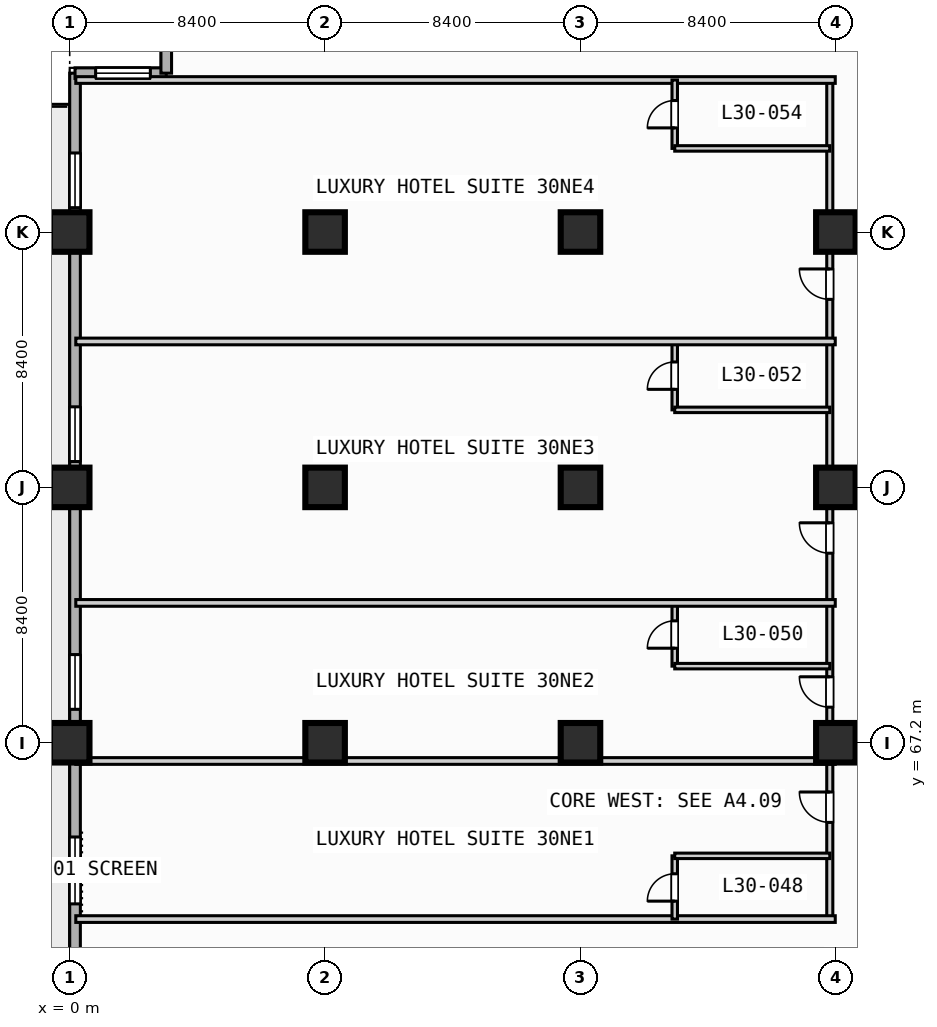
"""IFC4 building model, lengths in metres.
Left out: names, types, materials, properties, quantities, classifications, styles, units other than length and angle.
Written with IfcOpenShell. Run it as: python <this file> out.ifc"""

import sys

from ifc_helpers import new_model, si_unit, direction, frame, frame_2d, origin, origin_2d, place, context, subcontext, project, spatial, rectangle, extrude, element, fill, save


model = new_model("IFC4")
c1 = context("Model", 3, precision=1e-05, world=origin(), true_north=direction((0.0, 1.0)))
c2 = subcontext(c1, "Body", "Model", "MODEL_VIEW")
j1 = project(units=[si_unit("LENGTHUNIT", "METRE"), si_unit("PLANEANGLEUNIT", "RADIAN")], contexts=[c1])
p1 = place(None, origin())
s1 = spatial("IfcSite", under=j1, at=p1, CompositionType="ELEMENT")
p2 = place(p1, origin())
s2 = spatial("IfcBuilding", under=s1, at=p2, CompositionType="ELEMENT")
p3 = place(p2, frame((0.0, 0.0, 126.6)))
s3 = spatial("IfcBuildingStorey", under=s2, at=p3, CompositionType="ELEMENT", Elevation=126.6)
for number, where, z_axis, x_axis in (
    (1, (0.0, 67.2, 0.0), (0.0, 0.0, 1.0), (1.0, 0.0, 0.0)),
    (2, (0.0, 75.6, 0.0), (0.0, 0.0, 1.0), (1.0, 0.0, 0.0)),
    (3, (0.0, 84.0, 0.0), (0.0, 0.0, 1.0), (1.0, 0.0, 0.0)),
    (4, (8.4, 67.2, 0.0), (0.0, 0.0, 1.0), (1.0, 0.0, 0.0)),
    (5, (8.4, 75.6, 0.0), (0.0, 0.0, 1.0), (1.0, 0.0, 0.0)),
    (6, (8.4, 84.0, 0.0), (0.0, 0.0, 1.0), (1.0, 0.0, 0.0)),
    (7, (16.8, 67.2, 0.0), (0.0, 0.0, 1.0), (1.0, 0.0, 0.0)),
    (8, (16.8, 75.6, 0.0), (0.0, 0.0, 1.0), (1.0, 0.0, 0.0)),
    (9, (16.8, 84.0, 0.0), (0.0, 0.0, 1.0), (1.0, 0.0, 0.0)),
    (10, (25.2, 67.2, 0.0), (0.0, 0.0, 1.0), (1.0, 0.0, 0.0)),
    (11, (25.2, 75.6, 0.0), (0.0, 0.0, 1.0), (1.0, 0.0, 0.0)),
    (12, (25.2, 84.0, 0.0), (0.0, 0.0, 1.0), (1.0, 0.0, 0.0)),
):
    element("IfcColumn", number, at=place(p3, frame(where, z_axis=z_axis, x_axis=x_axis)), inside=s3, PredefinedType="COLUMN", context=c2, shape_type="SweptSolid", body=[
        extrude(rectangle(XDim=1.3, YDim=1.3, at=origin_2d()), origin(), (0.0, 0.0, 1.0), 3.8),
    ])
p4 = place(p3, frame((0.175, 3.175, 0.0), z_axis=(0.0, 0.0, 1.0), x_axis=(0.0, 1.0, 0.0)))
e13 = element("IfcWall", 13, at=p4, inside=s3, PredefinedType="STANDARD", context=c2, shape_type="SweptSolid", body=[
    extrude(rectangle(XDim=86.05, YDim=0.35, at=frame_2d((43.025, 0.0))), origin(), (0.0, 0.0, 1.0), 3.55),
])
p5 = place(p4, frame((42.325, 0.0, 0.0)))
e14 = element("IfcOpeningElement", 14, at=p5, cuts=e13, PredefinedType="OPENING", context=c2, shape_type="SweptSolid", body=[
    extrude(rectangle(XDim=1.4, YDim=2.2, at=frame_2d((0.7, 1.1))), frame((0.0, 0.185, 0.0), z_axis=(0.0, -1.0, 0.0), x_axis=(1.0, 0.0, 0.0)), (0.0, 0.0, 1.0), 0.37),
])
p6 = place(p4, frame((33.525, 0.0, 0.85)))
e15 = element("IfcOpeningElement", 15, at=p6, cuts=e13, PredefinedType="OPENING", context=c2, shape_type="SweptSolid", body=[
    extrude(rectangle(XDim=2.2, YDim=1.8, at=frame_2d((1.1, 0.9))), frame((0.0, 0.185, 0.0), z_axis=(0.0, -1.0, 0.0), x_axis=(1.0, 0.0, 0.0)), (0.0, 0.0, 1.0), 0.37),
])
p7 = place(p4, frame((58.725, 0.0, 0.85)))
e16 = element("IfcOpeningElement", 16, at=p7, cuts=e13, PredefinedType="OPENING", context=c2, shape_type="SweptSolid", body=[
    extrude(rectangle(XDim=2.2, YDim=1.8, at=frame_2d((1.1, 0.9))), frame((0.0, 0.185, 0.0), z_axis=(0.0, -1.0, 0.0), x_axis=(1.0, 0.0, 0.0)), (0.0, 0.0, 1.0), 0.37),
])
p8 = place(p4, frame((65.125, 0.0, 0.85)))
e17 = element("IfcOpeningElement", 17, at=p8, cuts=e13, PredefinedType="OPENING", context=c2, shape_type="SweptSolid", body=[
    extrude(rectangle(XDim=1.8, YDim=1.8, at=frame_2d((0.9, 0.9))), frame((0.0, 0.185, 0.0), z_axis=(0.0, -1.0, 0.0), x_axis=(1.0, 0.0, 0.0)), (0.0, 0.0, 1.0), 0.37),
])
p9 = place(p4, frame((73.275, 0.0, 0.85)))
e18 = element("IfcOpeningElement", 18, at=p9, cuts=e13, PredefinedType="OPENING", context=c2, shape_type="SweptSolid", body=[
    extrude(rectangle(XDim=1.8, YDim=1.8, at=frame_2d((0.9, 0.9))), frame((0.0, 0.185, 0.0), z_axis=(0.0, -1.0, 0.0), x_axis=(1.0, 0.0, 0.0)), (0.0, 0.0, 1.0), 0.37),
])
p10 = place(p4, frame((81.625, 0.0, 0.85)))
e19 = element("IfcOpeningElement", 19, at=p10, cuts=e13, PredefinedType="OPENING", context=c2, shape_type="SweptSolid", body=[
    extrude(rectangle(XDim=1.8, YDim=1.8, at=frame_2d((0.9, 0.9))), frame((0.0, 0.185, 0.0), z_axis=(0.0, -1.0, 0.0), x_axis=(1.0, 0.0, 0.0)), (0.0, 0.0, 1.0), 0.37),
])
p11 = place(p3, frame((0.175, 89.225, 0.0), z_axis=(0.0, 0.0, 1.0), x_axis=(1.0, 0.0, 0.0)))
e20 = element("IfcWall", 20, at=p11, inside=s3, PredefinedType="STANDARD", context=c2, shape_type="SweptSolid", body=[
    extrude(rectangle(XDim=3.0, YDim=0.35, at=frame_2d((1.5, 0.0))), origin(), (0.0, 0.0, 1.0), 3.55),
])
p12 = place(p11, frame((0.677, 0.0, 0.85)))
e21 = element("IfcOpeningElement", 21, at=p12, cuts=e20, PredefinedType="OPENING", context=c2, shape_type="SweptSolid", body=[
    extrude(rectangle(XDim=1.8, YDim=1.8, at=frame_2d((0.9, 0.9))), frame((0.0, 0.185, 0.0), z_axis=(0.0, -1.0, 0.0), x_axis=(1.0, 0.0, 0.0)), (0.0, 0.0, 1.0), 0.37),
])
p13 = place(p3, frame((3.175, 89.225, 0.0), z_axis=(0.0, 0.0, 1.0), x_axis=(0.0, 1.0, 0.0)))
e22 = element("IfcWall", 22, at=p13, inside=s3, PredefinedType="STANDARD", context=c2, shape_type="SweptSolid", body=[
    extrude(rectangle(XDim=3.0, YDim=0.35, at=frame_2d((1.5, 0.0))), origin(), (0.0, 0.0, 1.0), 3.55),
])
p14 = place(p3, frame((25.0, 61.4, 0.0), z_axis=(0.0, 0.0, 1.0), x_axis=(0.0, 1.0, 0.0)))
e23 = element("IfcWall", 23, at=p14, inside=s3, PredefinedType="PARTITIONING", context=c2, shape_type="SweptSolid", body=[
    extrude(rectangle(XDim=27.6, YDim=0.2, at=frame_2d((13.8, 0.0))), origin(), (0.0, 0.0, 1.0), 2.8),
])
p15 = place(p14, frame((3.18, 0.0, 0.0)))
e24 = element("IfcOpeningElement", 24, at=p15, cuts=e23, PredefinedType="OPENING", context=c2, shape_type="SweptSolid", body=[
    extrude(rectangle(XDim=1.0, YDim=2.15, at=frame_2d((0.5, 1.075))), frame((0.0, 0.11, 0.0), z_axis=(0.0, -1.0, 0.0), x_axis=(1.0, 0.0, 0.0)), (0.0, 0.0, 1.0), 0.22),
])
p16 = place(p14, frame((6.97, 0.0, 0.0)))
e25 = element("IfcOpeningElement", 25, at=p16, cuts=e23, PredefinedType="OPENING", context=c2, shape_type="SweptSolid", body=[
    extrude(rectangle(XDim=1.0, YDim=2.15, at=frame_2d((0.5, 1.075))), frame((0.0, 0.11, 0.0), z_axis=(0.0, -1.0, 0.0), x_axis=(1.0, 0.0, 0.0)), (0.0, 0.0, 1.0), 0.22),
])
p17 = place(p14, frame((12.035, 0.0, 0.0)))
e26 = element("IfcOpeningElement", 26, at=p17, cuts=e23, PredefinedType="OPENING", context=c2, shape_type="SweptSolid", body=[
    extrude(rectangle(XDim=1.0, YDim=2.15, at=frame_2d((0.5, 1.075))), frame((0.0, 0.11, 0.0), z_axis=(0.0, -1.0, 0.0), x_axis=(1.0, 0.0, 0.0)), (0.0, 0.0, 1.0), 0.22),
])
p18 = place(p14, frame((20.385, 0.0, 0.0)))
e27 = element("IfcOpeningElement", 27, at=p18, cuts=e23, PredefinedType="OPENING", context=c2, shape_type="SweptSolid", body=[
    extrude(rectangle(XDim=1.0, YDim=2.15, at=frame_2d((0.5, 1.075))), frame((0.0, 0.11, 0.0), z_axis=(0.0, -1.0, 0.0), x_axis=(1.0, 0.0, 0.0)), (0.0, 0.0, 1.0), 0.22),
])
p19 = place(p3, frame((0.2, 61.4, 0.0), z_axis=(0.0, 0.0, 1.0), x_axis=(1.0, 0.0, 0.0)))
e28 = element("IfcWall", 28, at=p19, inside=s3, PredefinedType="PARTITIONING", context=c2, shape_type="SweptSolid", body=[
    extrude(rectangle(XDim=24.98, YDim=0.22, at=frame_2d((12.49, 0.0))), origin(), (0.0, 0.0, 1.0), 3.55),
])
p20 = place(p3, frame((19.9, 61.4, 0.0), z_axis=(0.0, 0.0, 1.0), x_axis=(0.0, 1.0, 0.0)))
e29 = element("IfcWall", 29, at=p20, inside=s3, PredefinedType="PLUMBINGWALL", context=c2, shape_type="SweptSolid", body=[
    extrude(rectangle(XDim=2.08, YDim=0.18, at=frame_2d((1.04, 0.0))), origin(), (0.0, 0.0, 1.0), 3.55),
])
p21 = place(p20, frame((0.59, 0.0, 0.0)))
e30 = element("IfcOpeningElement", 30, at=p21, cuts=e29, PredefinedType="OPENING", context=c2, shape_type="SweptSolid", body=[
    extrude(rectangle(XDim=0.9, YDim=2.1, at=frame_2d((0.45, 1.05))), frame((0.0, 0.1, 0.0), z_axis=(0.0, -1.0, 0.0), x_axis=(1.0, 0.0, 0.0)), (0.0, 0.0, 1.0), 0.2),
])
p22 = place(p3, frame((19.9, 63.48, 0.0), z_axis=(0.0, 0.0, 1.0), x_axis=(1.0, 0.0, 0.0)))
e31 = element("IfcWall", 31, at=p22, inside=s3, PredefinedType="PLUMBINGWALL", context=c2, shape_type="SweptSolid", body=[
    extrude(rectangle(XDim=5.1, YDim=0.18, at=frame_2d((2.55, 0.0))), origin(), (0.0, 0.0, 1.0), 3.55),
])
p23 = place(p3, frame((0.2, 66.6, 0.0), z_axis=(0.0, 0.0, 1.0), x_axis=(1.0, 0.0, 0.0)))
e32 = element("IfcWall", 32, at=p23, inside=s3, PredefinedType="PARTITIONING", context=c2, shape_type="SweptSolid", body=[
    extrude(rectangle(XDim=24.98, YDim=0.22, at=frame_2d((12.49, 0.0))), origin(), (0.0, 0.0, 1.0), 3.55),
])
p24 = place(p3, frame((19.9, 69.72, 0.0), z_axis=(0.0, 0.0, 1.0), x_axis=(0.0, 1.0, 0.0)))
e33 = element("IfcWall", 33, at=p24, inside=s3, PredefinedType="PLUMBINGWALL", context=c2, shape_type="SweptSolid", body=[
    extrude(rectangle(XDim=2.08, YDim=0.18, at=frame_2d((1.04, 0.0))), origin(), (0.0, 0.0, 1.0), 3.55),
])
p25 = place(p24, frame((0.59, 0.0, 0.0)))
e34 = element("IfcOpeningElement", 34, at=p25, cuts=e33, PredefinedType="OPENING", context=c2, shape_type="SweptSolid", body=[
    extrude(rectangle(XDim=0.9, YDim=2.1, at=frame_2d((0.45, 1.05))), frame((0.0, 0.1, 0.0), z_axis=(0.0, -1.0, 0.0), x_axis=(1.0, 0.0, 0.0)), (0.0, 0.0, 1.0), 0.2),
])
p26 = place(p3, frame((19.9, 69.72, 0.0), z_axis=(0.0, 0.0, 1.0), x_axis=(1.0, 0.0, 0.0)))
e35 = element("IfcWall", 35, at=p26, inside=s3, PredefinedType="PLUMBINGWALL", context=c2, shape_type="SweptSolid", body=[
    extrude(rectangle(XDim=5.1, YDim=0.18, at=frame_2d((2.55, 0.0))), origin(), (0.0, 0.0, 1.0), 3.55),
])
p27 = place(p3, frame((0.2, 71.8, 0.0), z_axis=(0.0, 0.0, 1.0), x_axis=(1.0, 0.0, 0.0)))
e36 = element("IfcWall", 36, at=p27, inside=s3, PredefinedType="PARTITIONING", context=c2, shape_type="SweptSolid", body=[
    extrude(rectangle(XDim=24.98, YDim=0.22, at=frame_2d((12.49, 0.0))), origin(), (0.0, 0.0, 1.0), 3.55),
])
p28 = place(p3, frame((19.9, 78.15, 0.0), z_axis=(0.0, 0.0, 1.0), x_axis=(0.0, 1.0, 0.0)))
e37 = element("IfcWall", 37, at=p28, inside=s3, PredefinedType="PLUMBINGWALL", context=c2, shape_type="SweptSolid", body=[
    extrude(rectangle(XDim=2.25, YDim=0.18, at=frame_2d((1.125, 0.0))), origin(), (0.0, 0.0, 1.0), 3.55),
])
p29 = place(p28, frame((0.675, 0.0, 0.0)))
e38 = element("IfcOpeningElement", 38, at=p29, cuts=e37, PredefinedType="OPENING", context=c2, shape_type="SweptSolid", body=[
    extrude(rectangle(XDim=0.9, YDim=2.1, at=frame_2d((0.45, 1.05))), frame((0.0, 0.1, 0.0), z_axis=(0.0, -1.0, 0.0), x_axis=(1.0, 0.0, 0.0)), (0.0, 0.0, 1.0), 0.2),
])
p30 = place(p3, frame((19.9, 78.15, 0.0), z_axis=(0.0, 0.0, 1.0), x_axis=(1.0, 0.0, 0.0)))
e39 = element("IfcWall", 39, at=p30, inside=s3, PredefinedType="PLUMBINGWALL", context=c2, shape_type="SweptSolid", body=[
    extrude(rectangle(XDim=5.1, YDim=0.18, at=frame_2d((2.55, 0.0))), origin(), (0.0, 0.0, 1.0), 3.55),
])
for number, where, z_axis, x_axis in (
    (40, (0.2, 80.4, 0.0), (0.0, 0.0, 1.0), (1.0, 0.0, 0.0)),
    (41, (0.2, 89.0, 0.0), (0.0, 0.0, 1.0), (1.0, 0.0, 0.0)),
):
    element("IfcWall", number, at=place(p3, frame(where, z_axis=z_axis, x_axis=x_axis)), inside=s3, PredefinedType="PARTITIONING", context=c2, shape_type="SweptSolid", body=[
        extrude(rectangle(XDim=24.98, YDim=0.22, at=frame_2d((12.49, 0.0))), origin(), (0.0, 0.0, 1.0), 3.55),
    ])
p31 = place(p3, frame((19.9, 86.75, 0.0), z_axis=(0.0, 0.0, 1.0), x_axis=(0.0, 1.0, 0.0)))
e42 = element("IfcWall", 42, at=p31, inside=s3, PredefinedType="PLUMBINGWALL", context=c2, shape_type="SweptSolid", body=[
    extrude(rectangle(XDim=2.25, YDim=0.18, at=frame_2d((1.125, 0.0))), origin(), (0.0, 0.0, 1.0), 3.55),
])
p32 = place(p31, frame((0.675, 0.0, 0.0)))
e43 = element("IfcOpeningElement", 43, at=p32, cuts=e42, PredefinedType="OPENING", context=c2, shape_type="SweptSolid", body=[
    extrude(rectangle(XDim=0.9, YDim=2.1, at=frame_2d((0.45, 1.05))), frame((0.0, 0.1, 0.0), z_axis=(0.0, -1.0, 0.0), x_axis=(1.0, 0.0, 0.0)), (0.0, 0.0, 1.0), 0.2),
])
p33 = place(p3, frame((19.9, 86.75, 0.0), z_axis=(0.0, 0.0, 1.0), x_axis=(1.0, 0.0, 0.0)))
e44 = element("IfcWall", 44, at=p33, inside=s3, PredefinedType="PLUMBINGWALL", context=c2, shape_type="SweptSolid", body=[
    extrude(rectangle(XDim=5.1, YDim=0.18, at=frame_2d((2.55, 0.0))), origin(), (0.0, 0.0, 1.0), 3.55),
])
p34 = place(p7, origin())
e45 = element("IfcWindow", 45, at=p34, inside=s3, PartitioningType="SINGLE_PANEL", PredefinedType="WINDOW", context=c2, shape_type="SweptSolid", body=[
    extrude(rectangle(XDim=2.2, YDim=1.8, at=frame_2d((1.1, 0.9))), frame((0.0, 0.03, 0.0), z_axis=(0.0, -1.0, 0.0), x_axis=(1.0, 0.0, 0.0)), (0.0, 0.0, 1.0), 0.06),
])
fill(e16, e45)
p35 = place(p8, origin())
e46 = element("IfcWindow", 46, at=p35, inside=s3, PartitioningType="SINGLE_PANEL", PredefinedType="WINDOW", context=c2, shape_type="SweptSolid", body=[
    extrude(rectangle(XDim=1.8, YDim=1.8, at=frame_2d((0.9, 0.9))), frame((0.0, 0.03, 0.0), z_axis=(0.0, -1.0, 0.0), x_axis=(1.0, 0.0, 0.0)), (0.0, 0.0, 1.0), 0.06),
])
fill(e17, e46)
p36 = place(p9, origin())
e47 = element("IfcWindow", 47, at=p36, inside=s3, PartitioningType="SINGLE_PANEL", PredefinedType="WINDOW", context=c2, shape_type="SweptSolid", body=[
    extrude(rectangle(XDim=1.8, YDim=1.8, at=frame_2d((0.9, 0.9))), frame((0.0, 0.03, 0.0), z_axis=(0.0, -1.0, 0.0), x_axis=(1.0, 0.0, 0.0)), (0.0, 0.0, 1.0), 0.06),
])
fill(e18, e47)
p37 = place(p10, origin())
e48 = element("IfcWindow", 48, at=p37, inside=s3, PartitioningType="SINGLE_PANEL", PredefinedType="WINDOW", context=c2, shape_type="SweptSolid", body=[
    extrude(rectangle(XDim=1.8, YDim=1.8, at=frame_2d((0.9, 0.9))), frame((0.0, 0.03, 0.0), z_axis=(0.0, -1.0, 0.0), x_axis=(1.0, 0.0, 0.0)), (0.0, 0.0, 1.0), 0.06),
])
fill(e19, e48)
p38 = place(p12, origin())
e49 = element("IfcWindow", 49, at=p38, inside=s3, PartitioningType="SINGLE_PANEL", PredefinedType="WINDOW", context=c2, shape_type="SweptSolid", body=[
    extrude(rectangle(XDim=1.8, YDim=1.8, at=frame_2d((0.9, 0.9))), frame((0.0, 0.03, 0.0), z_axis=(0.0, -1.0, 0.0), x_axis=(1.0, 0.0, 0.0)), (0.0, 0.0, 1.0), 0.06),
])
fill(e21, e49)
p39 = place(p15, origin())
e50 = element("IfcDoor", 50, at=p39, inside=s3, OperationType="SINGLE_SWING_RIGHT", PredefinedType="DOOR", context=c2, shape_type="SweptSolid", body=[
    extrude(rectangle(XDim=1.0, YDim=2.15, at=frame_2d((0.5, 1.075))), frame((0.0, 0.025, 0.0), z_axis=(0.0, -1.0, 0.0), x_axis=(1.0, 0.0, 0.0)), (0.0, 0.0, 1.0), 0.05),
])
fill(e24, e50)
p40 = place(p16, origin())
e51 = element("IfcDoor", 51, at=p40, inside=s3, OperationType="SINGLE_SWING_RIGHT", PredefinedType="DOOR", context=c2, shape_type="SweptSolid", body=[
    extrude(rectangle(XDim=1.0, YDim=2.15, at=frame_2d((0.5, 1.075))), frame((0.0, 0.025, 0.0), z_axis=(0.0, -1.0, 0.0), x_axis=(1.0, 0.0, 0.0)), (0.0, 0.0, 1.0), 0.05),
])
fill(e25, e51)
p41 = place(p17, origin())
e52 = element("IfcDoor", 52, at=p41, inside=s3, OperationType="SINGLE_SWING_RIGHT", PredefinedType="DOOR", context=c2, shape_type="SweptSolid", body=[
    extrude(rectangle(XDim=1.0, YDim=2.15, at=frame_2d((0.5, 1.075))), frame((0.0, 0.025, 0.0), z_axis=(0.0, -1.0, 0.0), x_axis=(1.0, 0.0, 0.0)), (0.0, 0.0, 1.0), 0.05),
])
fill(e26, e52)
p42 = place(p18, origin())
e53 = element("IfcDoor", 53, at=p42, inside=s3, OperationType="SINGLE_SWING_RIGHT", PredefinedType="DOOR", context=c2, shape_type="SweptSolid", body=[
    extrude(rectangle(XDim=1.0, YDim=2.15, at=frame_2d((0.5, 1.075))), frame((0.0, 0.025, 0.0), z_axis=(0.0, -1.0, 0.0), x_axis=(1.0, 0.0, 0.0)), (0.0, 0.0, 1.0), 0.05),
])
fill(e27, e53)
p43 = place(p21, origin())
e54 = element("IfcDoor", 54, at=p43, inside=s3, OperationType="SINGLE_SWING_LEFT", PredefinedType="DOOR", context=c2, shape_type="SweptSolid", body=[
    extrude(rectangle(XDim=0.9, YDim=2.1, at=frame_2d((0.45, 1.05))), frame((0.0, 0.025, 0.0), z_axis=(0.0, -1.0, 0.0), x_axis=(1.0, 0.0, 0.0)), (0.0, 0.0, 1.0), 0.05),
])
fill(e30, e54)
p44 = place(p25, origin())
e55 = element("IfcDoor", 55, at=p44, inside=s3, OperationType="SINGLE_SWING_LEFT", PredefinedType="DOOR", context=c2, shape_type="SweptSolid", body=[
    extrude(rectangle(XDim=0.9, YDim=2.1, at=frame_2d((0.45, 1.05))), frame((0.0, 0.025, 0.0), z_axis=(0.0, -1.0, 0.0), x_axis=(1.0, 0.0, 0.0)), (0.0, 0.0, 1.0), 0.05),
])
fill(e34, e55)
p45 = place(p29, origin())
e56 = element("IfcDoor", 56, at=p45, inside=s3, OperationType="SINGLE_SWING_LEFT", PredefinedType="DOOR", context=c2, shape_type="SweptSolid", body=[
    extrude(rectangle(XDim=0.9, YDim=2.1, at=frame_2d((0.45, 1.05))), frame((0.0, 0.025, 0.0), z_axis=(0.0, -1.0, 0.0), x_axis=(1.0, 0.0, 0.0)), (0.0, 0.0, 1.0), 0.05),
])
fill(e38, e56)
p46 = place(p32, origin())
e57 = element("IfcDoor", 57, at=p46, inside=s3, OperationType="SINGLE_SWING_LEFT", PredefinedType="DOOR", context=c2, shape_type="SweptSolid", body=[
    extrude(rectangle(XDim=0.9, YDim=2.1, at=frame_2d((0.45, 1.05))), frame((0.0, 0.025, 0.0), z_axis=(0.0, -1.0, 0.0), x_axis=(1.0, 0.0, 0.0)), (0.0, 0.0, 1.0), 0.05),
])
fill(e43, e57)
save(model, sys.argv[1])
